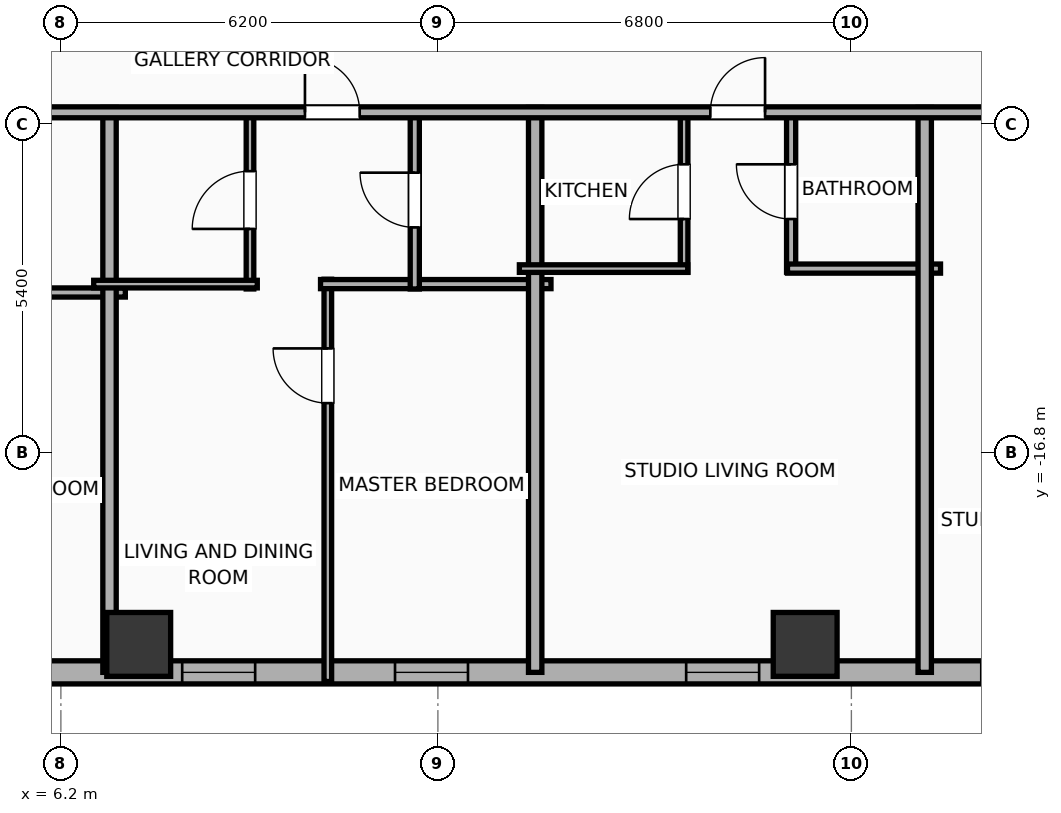
"""IFC4 building model, lengths in metres.
Left out: names, types, materials, properties, quantities, classifications, styles, units other than length and angle.
Written with IfcOpenShell. Run it as: python <this file> out.ifc"""

import sys

from ifc_helpers import new_model, si_unit, direction, frame, frame_2d, origin, origin_2d, place, context, subcontext, project, spatial, rectangle, hollow_rectangle, extrude, element, fill, save


model = new_model("IFC4")
c1 = context("Model", 3, precision=1e-05, world=origin(), true_north=direction((0.0, 1.0)))
c2 = subcontext(c1, "Body", "Model", "MODEL_VIEW")
j1 = project(units=[si_unit("LENGTHUNIT", "METRE"), si_unit("PLANEANGLEUNIT", "RADIAN")], contexts=[c1])
p1 = place(None, origin())
s1 = spatial("IfcSite", under=j1, at=p1, CompositionType="ELEMENT")
p2 = place(p1, origin())
s2 = spatial("IfcBuilding", under=s1, at=p2, CompositionType="ELEMENT")
p3 = place(p2, frame((0.0, 0.0, 120.9)))
s3 = spatial("IfcBuildingStorey", under=s2, at=p3, CompositionType="ELEMENT", Elevation=120.9)
for number, where, z_axis, x_axis in (
    (1, (7.48, -19.95, 0.0), (0.0, 0.0, 1.0), (1.0, 0.0, 0.0)),
    (2, (18.44, -19.95, 0.0), (0.0, 0.0, 1.0), (1.0, 0.0, 0.0)),
):
    element("IfcColumn", number, at=place(p3, frame(where, z_axis=z_axis, x_axis=x_axis)), inside=s3, PredefinedType="COLUMN", context=c2, shape_type="SweptSolid", body=[
        extrude(hollow_rectangle(XDim=1.05, YDim=1.05, WallThickness=0.036, at=origin_2d()), origin(), (0.0, 0.0, 1.0), 3.9),
    ])
p4 = place(p3, frame((29.381, -20.41, 0.0), z_axis=(0.0, 0.0, 1.0), x_axis=(-1.0, 0.0, 0.0)))
e3 = element("IfcWall", 3, at=p4, inside=s3, PredefinedType="ELEMENTEDWALL", context=c2, shape_type="SweptSolid", body=[
    extrude(rectangle(XDim=54.763, YDim=0.38, at=frame_2d((27.381, 0.0))), origin(), (0.0, 0.0, 1.0), 3.65),
])
p5 = place(p4, frame((5.645, 0.0, 0.75)))
e4 = element("IfcOpeningElement", 4, at=p5, cuts=e3, PredefinedType="OPENING", context=c2, shape_type="SweptSolid", body=[
    extrude(rectangle(XDim=2.4, YDim=2.1, at=frame_2d((1.2, 1.05))), frame((0.0, 0.2, 0.0), z_axis=(0.0, -1.0, 0.0), x_axis=(1.0, 0.0, 0.0)), (0.0, 0.0, 1.0), 0.4),
])
p6 = place(p4, frame((47.567, 0.0, 0.75)))
e5 = element("IfcOpeningElement", 5, at=p6, cuts=e3, PredefinedType="OPENING", context=c2, shape_type="SweptSolid", body=[
    extrude(rectangle(XDim=2.4, YDim=2.1, at=frame_2d((1.2, 1.05))), frame((0.0, 0.2, 0.0), z_axis=(0.0, -1.0, 0.0), x_axis=(1.0, 0.0, 0.0)), (0.0, 0.0, 1.0), 0.4),
])
p7 = place(p4, frame((51.831, 0.0, 0.75)))
e6 = element("IfcOpeningElement", 6, at=p7, cuts=e3, PredefinedType="OPENING", context=c2, shape_type="SweptSolid", body=[
    extrude(rectangle(XDim=1.2, YDim=2.05, at=frame_2d((0.6, 1.025))), frame((0.0, 0.2, 0.0), z_axis=(0.0, -1.0, 0.0), x_axis=(1.0, 0.0, 0.0)), (0.0, 0.0, 1.0), 0.4),
])
p8 = place(p4, frame((44.606, 0.0, 0.75)))
e7 = element("IfcOpeningElement", 7, at=p8, cuts=e3, PredefinedType="OPENING", context=c2, shape_type="SweptSolid", body=[
    extrude(rectangle(XDim=1.2, YDim=2.05, at=frame_2d((0.6, 1.025))), frame((0.0, 0.2, 0.0), z_axis=(0.0, -1.0, 0.0), x_axis=(1.0, 0.0, 0.0)), (0.0, 0.0, 1.0), 0.4),
])
p9 = place(p4, frame((40.986, 0.0, 0.75)))
e8 = element("IfcOpeningElement", 8, at=p9, cuts=e3, PredefinedType="OPENING", context=c2, shape_type="SweptSolid", body=[
    extrude(rectangle(XDim=1.2, YDim=2.05, at=frame_2d((0.6, 1.025))), frame((0.0, 0.2, 0.0), z_axis=(0.0, -1.0, 0.0), x_axis=(1.0, 0.0, 0.0)), (0.0, 0.0, 1.0), 0.4),
])
p10 = place(p4, frame((37.486, 0.0, 0.75)))
e9 = element("IfcOpeningElement", 9, at=p10, cuts=e3, PredefinedType="OPENING", context=c2, shape_type="SweptSolid", body=[
    extrude(rectangle(XDim=1.2, YDim=2.05, at=frame_2d((0.6, 1.025))), frame((0.0, 0.2, 0.0), z_axis=(0.0, -1.0, 0.0), x_axis=(1.0, 0.0, 0.0)), (0.0, 0.0, 1.0), 0.4),
])
p11 = place(p4, frame((33.986, 0.0, 0.75)))
e10 = element("IfcOpeningElement", 10, at=p11, cuts=e3, PredefinedType="OPENING", context=c2, shape_type="SweptSolid", body=[
    extrude(rectangle(XDim=1.2, YDim=2.05, at=frame_2d((0.6, 1.025))), frame((0.0, 0.2, 0.0), z_axis=(0.0, -1.0, 0.0), x_axis=(1.0, 0.0, 0.0)), (0.0, 0.0, 1.0), 0.4),
])
p12 = place(p4, frame((30.486, 0.0, 0.75)))
e11 = element("IfcOpeningElement", 11, at=p12, cuts=e3, PredefinedType="OPENING", context=c2, shape_type="SweptSolid", body=[
    extrude(rectangle(XDim=1.2, YDim=2.05, at=frame_2d((0.6, 1.025))), frame((0.0, 0.2, 0.0), z_axis=(0.0, -1.0, 0.0), x_axis=(1.0, 0.0, 0.0)), (0.0, 0.0, 1.0), 0.4),
])
p13 = place(p4, frame((26.986, 0.0, 0.75)))
e12 = element("IfcOpeningElement", 12, at=p13, cuts=e3, PredefinedType="OPENING", context=c2, shape_type="SweptSolid", body=[
    extrude(rectangle(XDim=1.2, YDim=2.05, at=frame_2d((0.6, 1.025))), frame((0.0, 0.2, 0.0), z_axis=(0.0, -1.0, 0.0), x_axis=(1.0, 0.0, 0.0)), (0.0, 0.0, 1.0), 0.4),
])
p14 = place(p4, frame((23.486, 0.0, 0.75)))
e13 = element("IfcOpeningElement", 13, at=p14, cuts=e3, PredefinedType="OPENING", context=c2, shape_type="SweptSolid", body=[
    extrude(rectangle(XDim=1.2, YDim=2.05, at=frame_2d((0.6, 1.025))), frame((0.0, 0.2, 0.0), z_axis=(0.0, -1.0, 0.0), x_axis=(1.0, 0.0, 0.0)), (0.0, 0.0, 1.0), 0.4),
])
p15 = place(p4, frame((19.986, 0.0, 0.75)))
e14 = element("IfcOpeningElement", 14, at=p15, cuts=e3, PredefinedType="OPENING", context=c2, shape_type="SweptSolid", body=[
    extrude(rectangle(XDim=1.2, YDim=2.05, at=frame_2d((0.6, 1.025))), frame((0.0, 0.2, 0.0), z_axis=(0.0, -1.0, 0.0), x_axis=(1.0, 0.0, 0.0)), (0.0, 0.0, 1.0), 0.4),
])
p16 = place(p4, frame((16.486, 0.0, 0.75)))
e15 = element("IfcOpeningElement", 15, at=p16, cuts=e3, PredefinedType="OPENING", context=c2, shape_type="SweptSolid", body=[
    extrude(rectangle(XDim=1.2, YDim=2.05, at=frame_2d((0.6, 1.025))), frame((0.0, 0.2, 0.0), z_axis=(0.0, -1.0, 0.0), x_axis=(1.0, 0.0, 0.0)), (0.0, 0.0, 1.0), 0.4),
])
p17 = place(p4, frame((11.698, 0.0, 0.75)))
e16 = element("IfcOpeningElement", 16, at=p17, cuts=e3, PredefinedType="OPENING", context=c2, shape_type="SweptSolid", body=[
    extrude(rectangle(XDim=1.2, YDim=2.05, at=frame_2d((0.6, 1.025))), frame((0.0, 0.2, 0.0), z_axis=(0.0, -1.0, 0.0), x_axis=(1.0, 0.0, 0.0)), (0.0, 0.0, 1.0), 0.4),
])
p18 = place(p4, frame((3.172, 0.0, 0.75)))
e17 = element("IfcOpeningElement", 17, at=p18, cuts=e3, PredefinedType="OPENING", context=c2, shape_type="SweptSolid", body=[
    extrude(rectangle(XDim=1.2, YDim=2.05, at=frame_2d((0.6, 1.025))), frame((0.0, 0.2, 0.0), z_axis=(0.0, -1.0, 0.0), x_axis=(1.0, 0.0, 0.0)), (0.0, 0.0, 1.0), 0.4),
])
p19 = place(p4, frame((1.13, 0.0, 0.75)))
e18 = element("IfcOpeningElement", 18, at=p19, cuts=e3, PredefinedType="OPENING", context=c2, shape_type="SweptSolid", body=[
    extrude(rectangle(XDim=1.2, YDim=2.05, at=frame_2d((0.6, 1.025))), frame((0.0, 0.2, 0.0), z_axis=(0.0, -1.0, 0.0), x_axis=(1.0, 0.0, 0.0)), (0.0, 0.0, 1.0), 0.4),
])
p20 = place(p3, frame((3.47, -14.163, 0.0), z_axis=(0.0, 0.0, 1.0), x_axis=(1.0, 0.0, 0.0)))
e19 = element("IfcWall", 19, at=p20, inside=s3, PredefinedType="PLUMBINGWALL", context=c2, shape_type="SweptSolid", body=[
    extrude(rectangle(XDim=3.79, YDim=0.15, at=frame_2d((1.895, 0.0))), origin(), (0.0, 0.0, 1.0), 3.65),
])
p21 = place(p3, frame((7.0, -20.41, 0.0), z_axis=(0.0, 0.0, 1.0), x_axis=(0.0, 1.0, 0.0)))
e20 = element("IfcWall", 20, at=p21, inside=s3, PredefinedType="PARTITIONING", context=c2, shape_type="SweptSolid", body=[
    extrude(rectangle(XDim=9.29, YDim=0.22, at=frame_2d((4.645, 0.0))), origin(), (0.0, 0.0, 1.0), 3.04),
])
p22 = place(p3, frame((10.59, -20.56, 0.0), z_axis=(0.0, 0.0, 1.0), x_axis=(0.0, 1.0, 0.0)))
e21 = element("IfcWall", 21, at=p22, inside=s3, PredefinedType="PARTITIONING", context=c2, shape_type="SweptSolid", body=[
    extrude(rectangle(XDim=6.615, YDim=0.125, at=frame_2d((3.308, 0.0))), origin(), (0.0, 0.0, 1.0), 3.65),
])
p23 = place(p22, frame((4.577, 0.0, 0.0)))
e22 = element("IfcOpeningElement", 22, at=p23, cuts=e21, PredefinedType="OPENING", context=c2, shape_type="SweptSolid", body=[
    extrude(rectangle(XDim=0.9, YDim=2.05, at=frame_2d((0.45, 1.025))), frame((0.0, 0.073, 0.0), z_axis=(0.0, -1.0, 0.0), x_axis=(1.0, 0.0, 0.0)), (0.0, 0.0, 1.0), 0.145),
])
p24 = place(p3, frame((10.47, -14.025, 0.0), z_axis=(0.0, 0.0, 1.0), x_axis=(1.0, 0.0, 0.0)))
e23 = element("IfcWall", 23, at=p24, inside=s3, PredefinedType="PLUMBINGWALL", context=c2, shape_type="SweptSolid", body=[
    extrude(rectangle(XDim=3.79, YDim=0.15, at=frame_2d((1.895, 0.0))), origin(), (0.0, 0.0, 1.0), 3.65),
])
p25 = place(p3, frame((9.31, -14.105, 0.0), z_axis=(0.0, 0.0, 1.0), x_axis=(0.0, 1.0, 0.0)))
e24 = element("IfcWall", 24, at=p25, inside=s3, PredefinedType="PARTITIONING", context=c2, shape_type="SweptSolid", body=[
    extrude(rectangle(XDim=2.925, YDim=0.125, at=frame_2d((1.462, 0.0))), origin(), (0.0, 0.0, 1.0), 3.65),
])
p26 = place(p25, frame((0.988, 0.0, 0.0)))
e25 = element("IfcOpeningElement", 25, at=p26, cuts=e24, PredefinedType="OPENING", context=c2, shape_type="SweptSolid", body=[
    extrude(rectangle(XDim=0.95, YDim=2.05, at=frame_2d((0.475, 1.025))), frame((0.0, 0.073, 0.0), z_axis=(0.0, -1.0, 0.0), x_axis=(1.0, 0.0, 0.0)), (0.0, 0.0, 1.0), 0.145),
])
p27 = place(p3, frame((6.74, -14.025, 0.0), z_axis=(0.0, 0.0, 1.0), x_axis=(1.0, 0.0, 0.0)))
e26 = element("IfcWall", 26, at=p27, inside=s3, PredefinedType="PARTITIONING", context=c2, shape_type="SweptSolid", body=[
    extrude(rectangle(XDim=2.69, YDim=0.125, at=frame_2d((1.345, 0.0))), origin(), (0.0, 0.0, 1.0), 3.65),
])
p28 = place(p3, frame((12.02, -14.105, 0.0), z_axis=(0.0, 0.0, 1.0), x_axis=(0.0, 1.0, 0.0)))
e27 = element("IfcWall", 27, at=p28, inside=s3, PredefinedType="PLUMBINGWALL", context=c2, shape_type="SweptSolid", body=[
    extrude(rectangle(XDim=2.925, YDim=0.15, at=frame_2d((1.462, 0.0))), origin(), (0.0, 0.0, 1.0), 3.65),
])
p29 = place(p28, frame((1.012, 0.0, 0.0)))
e28 = element("IfcOpeningElement", 28, at=p29, cuts=e27, PredefinedType="OPENING", context=c2, shape_type="SweptSolid", body=[
    extrude(rectangle(XDim=0.9, YDim=2.05, at=frame_2d((0.45, 1.025))), frame((0.0, 0.085, 0.0), z_axis=(0.0, -1.0, 0.0), x_axis=(1.0, 0.0, 0.0)), (0.0, 0.0, 1.0), 0.17),
])
p30 = place(p3, frame((14.0, -20.41, 0.0), z_axis=(0.0, 0.0, 1.0), x_axis=(0.0, 1.0, 0.0)))
e29 = element("IfcWall", 29, at=p30, inside=s3, PredefinedType="PARTITIONING", context=c2, shape_type="SweptSolid", body=[
    extrude(rectangle(XDim=9.29, YDim=0.22, at=frame_2d((4.645, 0.0))), origin(), (0.0, 0.0, 1.0), 3.65),
])
p31 = place(p3, frame((16.449, -13.83, 0.0), z_axis=(0.0, 0.0, 1.0), x_axis=(0.0, 1.0, 0.0)))
e30 = element("IfcWall", 30, at=p31, inside=s3, PredefinedType="PARTITIONING", context=c2, shape_type="SweptSolid", body=[
    extrude(rectangle(XDim=2.65, YDim=0.125, at=frame_2d((1.325, 0.0))), origin(), (0.0, 0.0, 1.0), 3.65),
])
p32 = place(p31, frame((0.875, 0.0, 0.0)))
e31 = element("IfcOpeningElement", 31, at=p32, cuts=e30, PredefinedType="OPENING", context=c2, shape_type="SweptSolid", body=[
    extrude(rectangle(XDim=0.9, YDim=2.05, at=frame_2d((0.45, 1.025))), frame((0.0, 0.073, 0.0), z_axis=(0.0, -1.0, 0.0), x_axis=(1.0, 0.0, 0.0)), (0.0, 0.0, 1.0), 0.145),
])
p33 = place(p3, frame((18.209, -13.83, 0.0), z_axis=(0.0, 0.0, 1.0), x_axis=(0.0, 1.0, 0.0)))
e32 = element("IfcWall", 32, at=p33, inside=s3, PredefinedType="PLUMBINGWALL", context=c2, shape_type="SweptSolid", body=[
    extrude(rectangle(XDim=2.65, YDim=0.15, at=frame_2d((1.325, 0.0))), origin(), (0.0, 0.0, 1.0), 3.65),
])
p34 = place(p33, frame((0.875, 0.0, 0.0)))
e33 = element("IfcOpeningElement", 33, at=p34, cuts=e32, PredefinedType="OPENING", context=c2, shape_type="SweptSolid", body=[
    extrude(rectangle(XDim=0.9, YDim=2.05, at=frame_2d((0.45, 1.025))), frame((0.0, 0.085, 0.0), z_axis=(0.0, -1.0, 0.0), x_axis=(1.0, 0.0, 0.0)), (0.0, 0.0, 1.0), 0.17),
])
p35 = place(p3, frame((13.74, -13.77, 0.0), z_axis=(0.0, 0.0, 1.0), x_axis=(1.0, 0.0, 0.0)))
e34 = element("IfcWall", 34, at=p35, inside=s3, PredefinedType="PARTITIONING", context=c2, shape_type="SweptSolid", body=[
    extrude(rectangle(XDim=2.769, YDim=0.125, at=frame_2d((1.385, 0.0))), origin(), (0.0, 0.0, 1.0), 3.65),
])
p36 = place(p3, frame((18.149, -13.77, 0.0), z_axis=(0.0, 0.0, 1.0), x_axis=(1.0, 0.0, 0.0)))
e35 = element("IfcWall", 35, at=p36, inside=s3, PredefinedType="PLUMBINGWALL", context=c2, shape_type="SweptSolid", body=[
    extrude(rectangle(XDim=2.517, YDim=0.15, at=frame_2d((1.259, 0.0))), origin(), (0.0, 0.0, 1.0), 3.65),
])
p37 = place(p3, frame((20.406, -20.41, 0.0), z_axis=(0.0, 0.0, 1.0), x_axis=(0.0, 1.0, 0.0)))
e36 = element("IfcWall", 36, at=p37, inside=s3, PredefinedType="PARTITIONING", context=c2, shape_type="SweptSolid", body=[
    extrude(rectangle(XDim=9.29, YDim=0.22, at=frame_2d((4.645, 0.0))), origin(), (0.0, 0.0, 1.0), 3.65),
])
p38 = place(p3, frame((-29.21, -11.2, 0.0), z_axis=(0.0, 0.0, 1.0), x_axis=(1.0, 0.0, 0.0)))
e37 = element("IfcWall", 37, at=p38, inside=s3, PredefinedType="PARTITIONING", context=c2, shape_type="SweptSolid", body=[
    extrude(rectangle(XDim=62.42, YDim=0.18, at=frame_2d((31.21, 0.0))), origin(), (0.0, 0.0, 1.0), 3.65),
])
p39 = place(p38, frame((3.357, 0.0, 0.0)))
e38 = element("IfcOpeningElement", 38, at=p39, cuts=e37, PredefinedType="OPENING", context=c2, shape_type="SweptSolid", body=[
    extrude(rectangle(XDim=1.15, YDim=2.05, at=frame_2d((0.575, 1.025))), frame((0.0, 0.1, 0.0), z_axis=(0.0, -1.0, 0.0), x_axis=(1.0, 0.0, 0.0)), (0.0, 0.0, 1.0), 0.2),
])
p40 = place(p38, frame((10.998, 0.0, 0.0)))
e39 = element("IfcOpeningElement", 39, at=p40, cuts=e37, PredefinedType="OPENING", context=c2, shape_type="SweptSolid", body=[
    extrude(rectangle(XDim=1.15, YDim=2.05, at=frame_2d((0.575, 1.025))), frame((0.0, 0.1, 0.0), z_axis=(0.0, -1.0, 0.0), x_axis=(1.0, 0.0, 0.0)), (0.0, 0.0, 1.0), 0.2),
])
p41 = place(p38, frame((18.426, 0.0, 0.0)))
e40 = element("IfcOpeningElement", 40, at=p41, cuts=e37, PredefinedType="OPENING", context=c2, shape_type="SweptSolid", body=[
    extrude(rectangle(XDim=0.9, YDim=2.05, at=frame_2d((0.45, 1.025))), frame((0.0, 0.1, 0.0), z_axis=(0.0, -1.0, 0.0), x_axis=(1.0, 0.0, 0.0)), (0.0, 0.0, 1.0), 0.2),
])
p42 = place(p38, frame((25.423, 0.0, 0.0)))
e41 = element("IfcOpeningElement", 41, at=p42, cuts=e37, PredefinedType="OPENING", context=c2, shape_type="SweptSolid", body=[
    extrude(rectangle(XDim=0.9, YDim=2.05, at=frame_2d((0.45, 1.025))), frame((0.0, 0.1, 0.0), z_axis=(0.0, -1.0, 0.0), x_axis=(1.0, 0.0, 0.0)), (0.0, 0.0, 1.0), 0.2),
])
p43 = place(p38, frame((32.427, 0.0, 0.0)))
e42 = element("IfcOpeningElement", 42, at=p43, cuts=e37, PredefinedType="OPENING", context=c2, shape_type="SweptSolid", body=[
    extrude(rectangle(XDim=0.9, YDim=2.05, at=frame_2d((0.45, 1.025))), frame((0.0, 0.1, 0.0), z_axis=(0.0, -1.0, 0.0), x_axis=(1.0, 0.0, 0.0)), (0.0, 0.0, 1.0), 0.2),
])
p44 = place(p38, frame((39.424, 0.0, 0.0)))
e43 = element("IfcOpeningElement", 43, at=p44, cuts=e37, PredefinedType="OPENING", context=c2, shape_type="SweptSolid", body=[
    extrude(rectangle(XDim=0.9, YDim=2.05, at=frame_2d((0.45, 1.025))), frame((0.0, 0.1, 0.0), z_axis=(0.0, -1.0, 0.0), x_axis=(1.0, 0.0, 0.0)), (0.0, 0.0, 1.0), 0.2),
])
p45 = place(p38, frame((46.09, 0.0, 0.0)))
e44 = element("IfcOpeningElement", 44, at=p45, cuts=e37, PredefinedType="OPENING", context=c2, shape_type="SweptSolid", body=[
    extrude(rectangle(XDim=0.9, YDim=2.05, at=frame_2d((0.45, 1.025))), frame((0.0, 0.1, 0.0), z_axis=(0.0, -1.0, 0.0), x_axis=(1.0, 0.0, 0.0)), (0.0, 0.0, 1.0), 0.2),
])
p46 = place(p38, frame((51.071, 0.0, 0.0)))
e45 = element("IfcOpeningElement", 45, at=p46, cuts=e37, PredefinedType="OPENING", context=c2, shape_type="SweptSolid", body=[
    extrude(rectangle(XDim=1.15, YDim=2.05, at=frame_2d((0.575, 1.025))), frame((0.0, 0.1, 0.0), z_axis=(0.0, -1.0, 0.0), x_axis=(1.0, 0.0, 0.0)), (0.0, 0.0, 1.0), 0.2),
])
p47 = place(p38, frame((58.93, 0.0, 0.0)))
e46 = element("IfcOpeningElement", 46, at=p47, cuts=e37, PredefinedType="OPENING", context=c2, shape_type="SweptSolid", body=[
    extrude(rectangle(XDim=0.9, YDim=2.05, at=frame_2d((0.45, 1.025))), frame((0.0, 0.1, 0.0), z_axis=(0.0, -1.0, 0.0), x_axis=(1.0, 0.0, 0.0)), (0.0, 0.0, 1.0), 0.2),
])
p48 = place(p5, origin())
e47 = element("IfcWindow", 47, at=p48, inside=s3, PartitioningType="SINGLE_PANEL", PredefinedType="WINDOW", context=c2, shape_type="SweptSolid", body=[
    extrude(rectangle(XDim=2.4, YDim=2.1, at=frame_2d((1.2, 1.05))), frame((0.0, 0.03, 0.0), z_axis=(0.0, -1.0, 0.0), x_axis=(1.0, 0.0, 0.0)), (0.0, 0.0, 1.0), 0.06),
])
fill(e4, e47)
p49 = place(p15, origin())
e48 = element("IfcWindow", 48, at=p49, inside=s3, PartitioningType="SINGLE_PANEL", PredefinedType="WINDOW", context=c2, shape_type="SweptSolid", body=[
    extrude(rectangle(XDim=1.2, YDim=2.05, at=frame_2d((0.6, 1.025))), frame((0.0, 0.03, 0.0), z_axis=(0.0, -1.0, 0.0), x_axis=(1.0, 0.0, 0.0)), (0.0, 0.0, 1.0), 0.06),
])
fill(e14, e48)
p50 = place(p16, origin())
e49 = element("IfcWindow", 49, at=p50, inside=s3, PartitioningType="SINGLE_PANEL", PredefinedType="WINDOW", context=c2, shape_type="SweptSolid", body=[
    extrude(rectangle(XDim=1.2, YDim=2.05, at=frame_2d((0.6, 1.025))), frame((0.0, 0.03, 0.0), z_axis=(0.0, -1.0, 0.0), x_axis=(1.0, 0.0, 0.0)), (0.0, 0.0, 1.0), 0.06),
])
fill(e15, e49)
p51 = place(p17, origin())
e50 = element("IfcWindow", 50, at=p51, inside=s3, PartitioningType="SINGLE_PANEL", PredefinedType="WINDOW", context=c2, shape_type="SweptSolid", body=[
    extrude(rectangle(XDim=1.2, YDim=2.05, at=frame_2d((0.6, 1.025))), frame((0.0, 0.03, 0.0), z_axis=(0.0, -1.0, 0.0), x_axis=(1.0, 0.0, 0.0)), (0.0, 0.0, 1.0), 0.06),
])
fill(e16, e50)
p52 = place(p23, origin())
e51 = element("IfcDoor", 51, at=p52, inside=s3, OperationType="SINGLE_SWING_RIGHT", PredefinedType="DOOR", context=c2, shape_type="SweptSolid", body=[
    extrude(rectangle(XDim=0.9, YDim=2.05, at=frame_2d((0.45, 1.025))), frame((0.0, 0.025, 0.0), z_axis=(0.0, -1.0, 0.0), x_axis=(1.0, 0.0, 0.0)), (0.0, 0.0, 1.0), 0.05),
])
fill(e22, e51)
p53 = place(p26, origin())
e52 = element("IfcDoor", 52, at=p53, inside=s3, OperationType="SINGLE_SWING_LEFT", PredefinedType="DOOR", context=c2, shape_type="SweptSolid", body=[
    extrude(rectangle(XDim=0.95, YDim=2.05, at=frame_2d((0.475, 1.025))), frame((0.0, 0.025, 0.0), z_axis=(0.0, -1.0, 0.0), x_axis=(1.0, 0.0, 0.0)), (0.0, 0.0, 1.0), 0.05),
])
fill(e25, e52)
p54 = place(p29, origin())
e53 = element("IfcDoor", 53, at=p54, inside=s3, OperationType="SINGLE_SWING_RIGHT", PredefinedType="DOOR", context=c2, shape_type="SweptSolid", body=[
    extrude(rectangle(XDim=0.9, YDim=2.05, at=frame_2d((0.45, 1.025))), frame((0.0, 0.025, 0.0), z_axis=(0.0, -1.0, 0.0), x_axis=(1.0, 0.0, 0.0)), (0.0, 0.0, 1.0), 0.05),
])
fill(e28, e53)
p55 = place(p32, origin())
e54 = element("IfcDoor", 54, at=p55, inside=s3, OperationType="SINGLE_SWING_LEFT", PredefinedType="DOOR", context=c2, shape_type="SweptSolid", body=[
    extrude(rectangle(XDim=0.9, YDim=2.05, at=frame_2d((0.45, 1.025))), frame((0.0, 0.025, 0.0), z_axis=(0.0, -1.0, 0.0), x_axis=(1.0, 0.0, 0.0)), (0.0, 0.0, 1.0), 0.05),
])
fill(e31, e54)
p56 = place(p34, origin())
e55 = element("IfcDoor", 55, at=p56, inside=s3, OperationType="SINGLE_SWING_RIGHT", PredefinedType="DOOR", context=c2, shape_type="SweptSolid", body=[
    extrude(rectangle(XDim=0.9, YDim=2.05, at=frame_2d((0.45, 1.025))), frame((0.0, 0.025, 0.0), z_axis=(0.0, -1.0, 0.0), x_axis=(1.0, 0.0, 0.0)), (0.0, 0.0, 1.0), 0.05),
])
fill(e33, e55)
p57 = place(p44, origin())
e56 = element("IfcDoor", 56, at=p57, inside=s3, OperationType="SINGLE_SWING_LEFT", PredefinedType="DOOR", context=c2, shape_type="SweptSolid", body=[
    extrude(rectangle(XDim=0.9, YDim=2.05, at=frame_2d((0.45, 1.025))), frame((0.0, 0.025, 0.0), z_axis=(0.0, -1.0, 0.0), x_axis=(1.0, 0.0, 0.0)), (0.0, 0.0, 1.0), 0.05),
])
fill(e43, e56)
p58 = place(p45, origin())
e57 = element("IfcDoor", 57, at=p58, inside=s3, OperationType="SINGLE_SWING_RIGHT", PredefinedType="DOOR", context=c2, shape_type="SweptSolid", body=[
    extrude(rectangle(XDim=0.9, YDim=2.05, at=frame_2d((0.45, 1.025))), frame((0.0, 0.025, 0.0), z_axis=(0.0, -1.0, 0.0), x_axis=(1.0, 0.0, 0.0)), (0.0, 0.0, 1.0), 0.05),
])
fill(e44, e57)
save(model, sys.argv[1])
